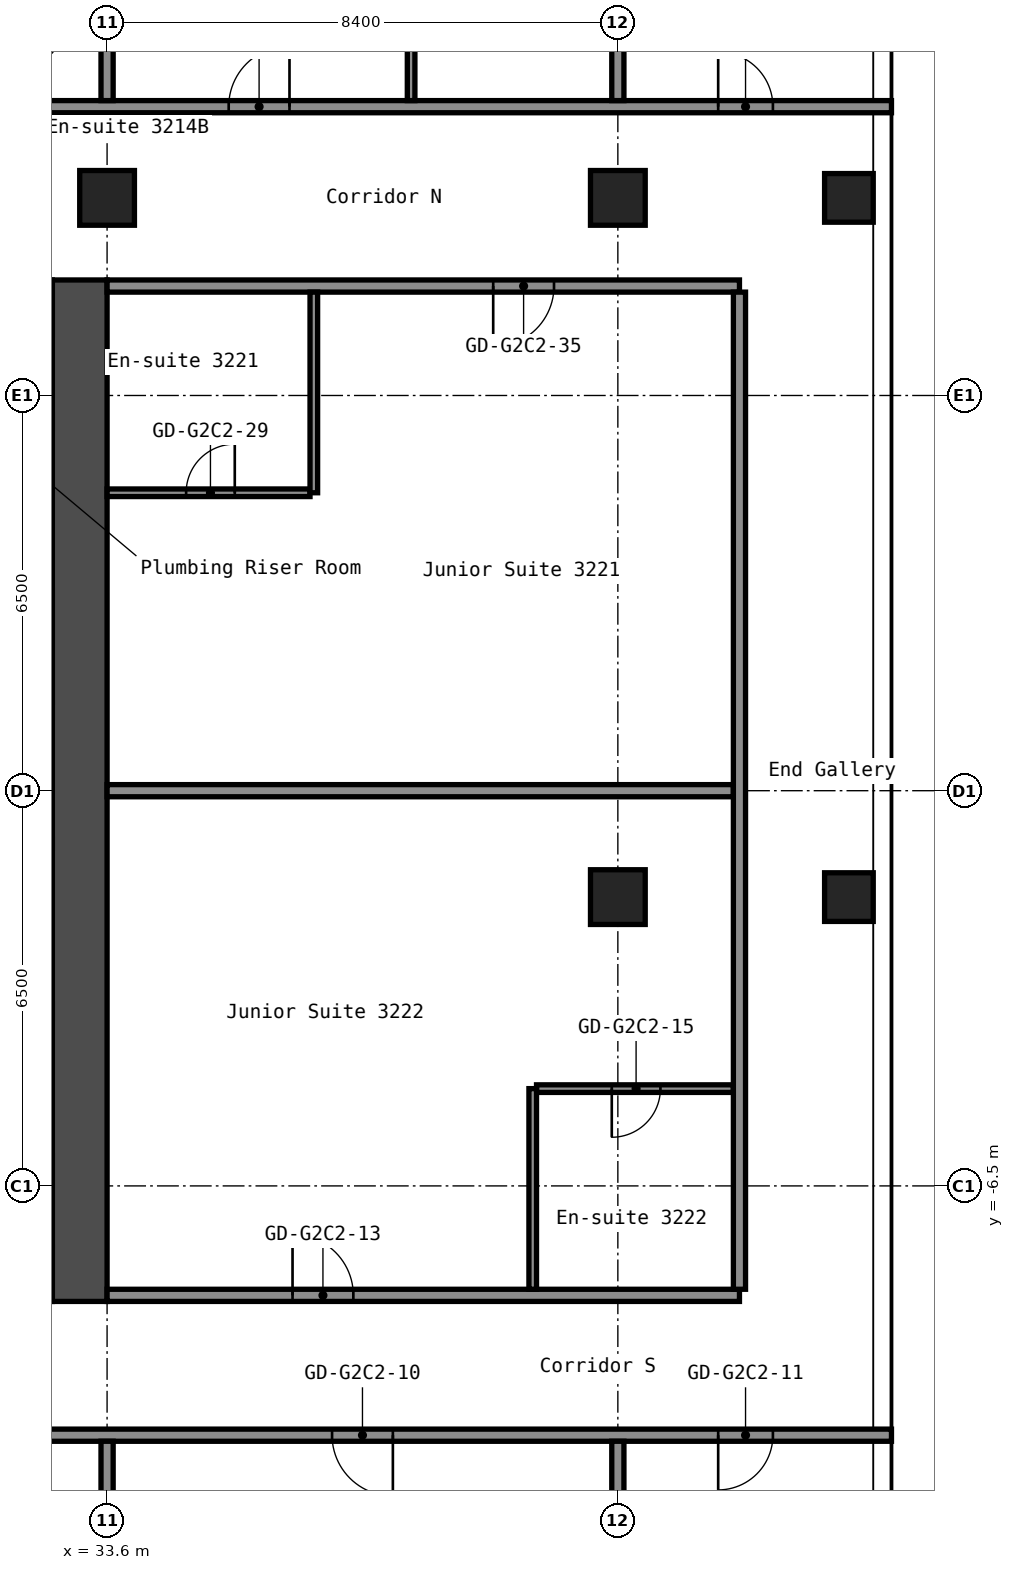
"""IFC4 building model, lengths in metres.
Left out: names, types, materials, properties, quantities, classifications, styles, units other than length and angle.
Written with IfcOpenShell. Run it as: python <this file> out.ifc"""

import sys

from ifc_helpers import new_model, si_unit, direction, frame, frame_2d, origin, origin_2d, place, context, subcontext, project, spatial, rectangle, hollow_rectangle, extrude, element, fill, save


model = new_model("IFC4")
c1 = context("Model", 3, precision=1e-05, world=origin(), true_north=direction((0.0, 1.0)))
c2 = subcontext(c1, "Body", "Model", "MODEL_VIEW")
j1 = project(units=[si_unit("LENGTHUNIT", "METRE"), si_unit("PLANEANGLEUNIT", "RADIAN")], contexts=[c1])
p1 = place(None, origin())
s1 = spatial("IfcSite", under=j1, at=p1, CompositionType="ELEMENT")
p2 = place(p1, origin())
s2 = spatial("IfcBuilding", under=s1, at=p2, CompositionType="ELEMENT")
p3 = place(p2, frame((0.0, 0.0, 113.8)))
s3 = spatial("IfcBuildingStorey", under=s2, at=p3, CompositionType="ELEMENT", Elevation=113.8)
for number, where, z_axis, x_axis in (
    (1, (33.6, 9.75, 0.0), (0.0, 0.0, 1.0), (1.0, 0.0, 0.0)),
    (2, (42.0, -1.75, 0.0), (0.0, 0.0, 1.0), (1.0, 0.0, 0.0)),
    (3, (42.0, 9.75, 0.0), (0.0, 0.0, 1.0), (1.0, 0.0, 0.0)),
):
    element("IfcColumn", number, at=place(p3, frame(where, z_axis=z_axis, x_axis=x_axis)), inside=s3, PredefinedType="COLUMN", context=c2, shape_type="SweptSolid", body=[
        extrude(hollow_rectangle(XDim=0.9, YDim=0.9, WallThickness=0.036, at=origin_2d()), origin(), (0.0, 0.0, 1.0), 2.8),
    ])
for number, where, z_axis, x_axis in (
    (4, (45.8, -1.75, 0.0), (0.0, 0.0, 1.0), (1.0, 0.0, 0.0)),
    (5, (45.8, 9.75, 0.0), (0.0, 0.0, 1.0), (1.0, 0.0, 0.0)),
):
    element("IfcColumn", number, at=place(p3, frame(where, z_axis=z_axis, x_axis=x_axis)), inside=s3, PredefinedType="COLUMN", context=c2, shape_type="SweptSolid", body=[
        extrude(hollow_rectangle(XDim=0.8, YDim=0.8, WallThickness=0.032, at=origin_2d()), origin(), (0.0, 0.0, 1.0), 2.8),
    ])
p4 = place(p3, frame((33.15, -8.4, 0.0), z_axis=(0.0, 0.0, 1.0), x_axis=(0.0, 1.0, 0.0)))
e6 = element("IfcWall", 6, at=p4, inside=s3, PredefinedType="SHEAR", context=c2, shape_type="SweptSolid", body=[
    extrude(rectangle(XDim=16.8, YDim=0.9, at=frame_2d((8.4, 0.0))), origin(), (0.0, 0.0, 1.0), 2.8),
])
p5 = place(p3, frame((16.8, -10.6, 0.0), z_axis=(0.0, 0.0, 1.0), x_axis=(1.0, 0.0, 0.0)))
e7 = element("IfcWall", 7, at=p5, inside=s3, PredefinedType="PARTITIONING", context=c2, shape_type="SweptSolid", body=[
    extrude(rectangle(XDim=29.7, YDim=0.2, at=frame_2d((14.85, 0.0))), origin(), (0.0, 0.0, 1.0), 2.8),
])
p6 = place(p5, frame((3.7, 0.0, 0.0)))
e8 = element("IfcOpeningElement", 8, at=p6, cuts=e7, PredefinedType="OPENING", context=c2, shape_type="SweptSolid", body=[
    extrude(rectangle(XDim=1.0, YDim=2.1, at=frame_2d((0.5, 1.05))), frame((0.0, 0.11, 0.0), z_axis=(0.0, -1.0, 0.0), x_axis=(1.0, 0.0, 0.0)), (0.0, 0.0, 1.0), 0.22),
])
p7 = place(p5, frame((9.46, 0.0, 0.0)))
e9 = element("IfcOpeningElement", 9, at=p7, cuts=e7, PredefinedType="OPENING", context=c2, shape_type="SweptSolid", body=[
    extrude(rectangle(XDim=0.9, YDim=2.1, at=frame_2d((0.45, 1.05))), frame((0.0, 0.11, 0.0), z_axis=(0.0, -1.0, 0.0), x_axis=(1.0, 0.0, 0.0)), (0.0, 0.0, 1.0), 0.22),
])
p8 = place(p5, frame((13.66, 0.0, 0.0)))
e10 = element("IfcOpeningElement", 10, at=p8, cuts=e7, PredefinedType="OPENING", context=c2, shape_type="SweptSolid", body=[
    extrude(rectangle(XDim=0.9, YDim=2.1, at=frame_2d((0.45, 1.05))), frame((0.0, 0.11, 0.0), z_axis=(0.0, -1.0, 0.0), x_axis=(1.0, 0.0, 0.0)), (0.0, 0.0, 1.0), 0.22),
])
p9 = place(p5, frame((20.5, 0.0, 0.0)))
e11 = element("IfcOpeningElement", 11, at=p9, cuts=e7, PredefinedType="OPENING", context=c2, shape_type="SweptSolid", body=[
    extrude(rectangle(XDim=1.0, YDim=2.1, at=frame_2d((0.5, 1.05))), frame((0.0, 0.11, 0.0), z_axis=(0.0, -1.0, 0.0), x_axis=(1.0, 0.0, 0.0)), (0.0, 0.0, 1.0), 0.22),
])
p10 = place(p5, frame((26.85, 0.0, 0.0)))
e12 = element("IfcOpeningElement", 12, at=p10, cuts=e7, PredefinedType="OPENING", context=c2, shape_type="SweptSolid", body=[
    extrude(rectangle(XDim=0.9, YDim=2.1, at=frame_2d((0.45, 1.05))), frame((0.0, 0.11, 0.0), z_axis=(0.0, -1.0, 0.0), x_axis=(1.0, 0.0, 0.0)), (0.0, 0.0, 1.0), 0.22),
])
p11 = place(p3, frame((33.6, -8.3, 0.0), z_axis=(0.0, 0.0, 1.0), x_axis=(1.0, 0.0, 0.0)))
e13 = element("IfcWall", 13, at=p11, inside=s3, PredefinedType="PARTITIONING", context=c2, shape_type="SweptSolid", body=[
    extrude(rectangle(XDim=10.4, YDim=0.2, at=frame_2d((5.2, 0.0))), origin(), (0.0, 0.0, 1.0), 2.8),
])
p12 = place(p11, frame((3.05, 0.0, 0.0)))
e14 = element("IfcOpeningElement", 14, at=p12, cuts=e13, PredefinedType="OPENING", context=c2, shape_type="SweptSolid", body=[
    extrude(rectangle(XDim=1.0, YDim=2.1, at=frame_2d((0.5, 1.05))), frame((0.0, 0.11, 0.0), z_axis=(0.0, -1.0, 0.0), x_axis=(1.0, 0.0, 0.0)), (0.0, 0.0, 1.0), 0.22),
])
p13 = place(p3, frame((40.663, -4.9, 0.0), z_axis=(0.0, 0.0, 1.0), x_axis=(1.0, 0.0, 0.0)))
e15 = element("IfcWall", 15, at=p13, inside=s3, PredefinedType="PARTITIONING", context=c2, shape_type="SweptSolid", body=[
    extrude(rectangle(XDim=3.237, YDim=0.125, at=frame_2d((1.619, 0.0))), origin(), (0.0, 0.0, 1.0), 2.8),
])
p14 = place(p13, frame((1.238, 0.0, 0.0)))
e16 = element("IfcOpeningElement", 16, at=p14, cuts=e15, PredefinedType="OPENING", context=c2, shape_type="SweptSolid", body=[
    extrude(rectangle(XDim=0.8, YDim=2.1, at=frame_2d((0.4, 1.05))), frame((0.0, 0.073, 0.0), z_axis=(0.0, -1.0, 0.0), x_axis=(1.0, 0.0, 0.0)), (0.0, 0.0, 1.0), 0.145),
])
p15 = place(p3, frame((33.6, 0.0, 0.0), z_axis=(0.0, 0.0, 1.0), x_axis=(1.0, 0.0, 0.0)))
e17 = element("IfcWall", 17, at=p15, inside=s3, PredefinedType="PARTITIONING", context=c2, shape_type="SweptSolid", body=[
    extrude(rectangle(XDim=10.3, YDim=0.2, at=frame_2d((5.15, 0.0))), origin(), (0.0, 0.0, 1.0), 2.8),
])
p16 = place(p3, frame((33.6, 4.9, 0.0), z_axis=(0.0, 0.0, 1.0), x_axis=(1.0, 0.0, 0.0)))
e18 = element("IfcWall", 18, at=p16, inside=s3, PredefinedType="PARTITIONING", context=c2, shape_type="SweptSolid", body=[
    extrude(rectangle(XDim=3.337, YDim=0.125, at=frame_2d((1.669, 0.0))), origin(), (0.0, 0.0, 1.0), 2.8),
])
p17 = place(p16, frame((1.3, 0.0, 0.0)))
e19 = element("IfcOpeningElement", 19, at=p17, cuts=e18, PredefinedType="OPENING", context=c2, shape_type="SweptSolid", body=[
    extrude(rectangle(XDim=0.8, YDim=2.1, at=frame_2d((0.4, 1.05))), frame((0.0, 0.073, 0.0), z_axis=(0.0, -1.0, 0.0), x_axis=(1.0, 0.0, 0.0)), (0.0, 0.0, 1.0), 0.145),
])
p18 = place(p3, frame((33.6, 8.3, 0.0), z_axis=(0.0, 0.0, 1.0), x_axis=(1.0, 0.0, 0.0)))
e20 = element("IfcWall", 20, at=p18, inside=s3, PredefinedType="PARTITIONING", context=c2, shape_type="SweptSolid", body=[
    extrude(rectangle(XDim=10.4, YDim=0.2, at=frame_2d((5.2, 0.0))), origin(), (0.0, 0.0, 1.0), 2.8),
])
p19 = place(p18, frame((6.35, 0.0, 0.0)))
e21 = element("IfcOpeningElement", 21, at=p19, cuts=e20, PredefinedType="OPENING", context=c2, shape_type="SweptSolid", body=[
    extrude(rectangle(XDim=1.0, YDim=2.1, at=frame_2d((0.5, 1.05))), frame((0.0, 0.11, 0.0), z_axis=(0.0, -1.0, 0.0), x_axis=(1.0, 0.0, 0.0)), (0.0, 0.0, 1.0), 0.22),
])
p20 = place(p3, frame((16.8, 11.25, 0.0), z_axis=(0.0, 0.0, 1.0), x_axis=(1.0, 0.0, 0.0)))
e22 = element("IfcWall", 22, at=p20, inside=s3, PredefinedType="PARTITIONING", context=c2, shape_type="SweptSolid", body=[
    extrude(rectangle(XDim=29.7, YDim=0.2, at=frame_2d((14.85, 0.0))), origin(), (0.0, 0.0, 1.0), 2.8),
])
p21 = place(p20, frame((2.0, 0.0, 0.0)))
e23 = element("IfcOpeningElement", 23, at=p21, cuts=e22, PredefinedType="OPENING", context=c2, shape_type="SweptSolid", body=[
    extrude(rectangle(XDim=1.0, YDim=2.1, at=frame_2d((0.5, 1.05))), frame((0.0, 0.11, 0.0), z_axis=(0.0, -1.0, 0.0), x_axis=(1.0, 0.0, 0.0)), (0.0, 0.0, 1.0), 0.22),
])
p22 = place(p20, frame((11.25, 0.0, 0.0)))
e24 = element("IfcOpeningElement", 24, at=p22, cuts=e22, PredefinedType="OPENING", context=c2, shape_type="SweptSolid", body=[
    extrude(rectangle(XDim=1.0, YDim=2.1, at=frame_2d((0.5, 1.05))), frame((0.0, 0.11, 0.0), z_axis=(0.0, -1.0, 0.0), x_axis=(1.0, 0.0, 0.0)), (0.0, 0.0, 1.0), 0.22),
])
p23 = place(p20, frame((12.95, 0.0, 0.0)))
e25 = element("IfcOpeningElement", 25, at=p23, cuts=e22, PredefinedType="OPENING", context=c2, shape_type="SweptSolid", body=[
    extrude(rectangle(XDim=1.0, YDim=2.1, at=frame_2d((0.5, 1.05))), frame((0.0, 0.11, 0.0), z_axis=(0.0, -1.0, 0.0), x_axis=(1.0, 0.0, 0.0)), (0.0, 0.0, 1.0), 0.22),
])
p24 = place(p20, frame((18.8, 0.0, 0.0)))
e26 = element("IfcOpeningElement", 26, at=p24, cuts=e22, PredefinedType="OPENING", context=c2, shape_type="SweptSolid", body=[
    extrude(rectangle(XDim=1.0, YDim=2.1, at=frame_2d((0.5, 1.05))), frame((0.0, 0.11, 0.0), z_axis=(0.0, -1.0, 0.0), x_axis=(1.0, 0.0, 0.0)), (0.0, 0.0, 1.0), 0.22),
])
p25 = place(p20, frame((26.85, 0.0, 0.0)))
e27 = element("IfcOpeningElement", 27, at=p25, cuts=e22, PredefinedType="OPENING", context=c2, shape_type="SweptSolid", body=[
    extrude(rectangle(XDim=0.9, YDim=2.1, at=frame_2d((0.45, 1.05))), frame((0.0, 0.11, 0.0), z_axis=(0.0, -1.0, 0.0), x_axis=(1.0, 0.0, 0.0)), (0.0, 0.0, 1.0), 0.22),
])
p26 = place(p3, frame((33.6, -15.55, 0.0), z_axis=(0.0, 0.0, 1.0), x_axis=(0.0, 1.0, 0.0)))
e28 = element("IfcWall", 28, at=p26, inside=s3, PredefinedType="PARTITIONING", context=c2, shape_type="SweptSolid", body=[
    extrude(rectangle(XDim=4.85, YDim=0.2, at=frame_2d((2.425, 0.0))), origin(), (0.0, 0.0, 1.0), 2.8),
])
p27 = place(p3, frame((33.6, 11.35, 0.0), z_axis=(0.0, 0.0, 1.0), x_axis=(0.0, 1.0, 0.0)))
e29 = element("IfcWall", 29, at=p27, inside=s3, PredefinedType="PARTITIONING", context=c2, shape_type="SweptSolid", body=[
    extrude(rectangle(XDim=12.2, YDim=0.2, at=frame_2d((6.1, 0.0))), origin(), (0.0, 0.0, 1.0), 2.8),
])
p28 = place(p3, frame((37.0, 4.9, 0.0), z_axis=(0.0, 0.0, 1.0), x_axis=(0.0, 1.0, 0.0)))
e30 = element("IfcWall", 30, at=p28, inside=s3, PredefinedType="PARTITIONING", context=c2, shape_type="SweptSolid", body=[
    extrude(rectangle(XDim=3.3, YDim=0.125, at=frame_2d((1.65, 0.0))), origin(), (0.0, 0.0, 1.0), 2.8),
])
p29 = place(p3, frame((38.6, 11.35, 0.0), z_axis=(0.0, 0.0, 1.0), x_axis=(0.0, 1.0, 0.0)))
e31 = element("IfcWall", 31, at=p29, inside=s3, PredefinedType="PARTITIONING", context=c2, shape_type="SweptSolid", body=[
    extrude(rectangle(XDim=3.3, YDim=0.125, at=frame_2d((1.65, 0.0))), origin(), (0.0, 0.0, 1.0), 2.8),
])
p30 = place(p3, frame((40.6, -8.2, 0.0), z_axis=(0.0, 0.0, 1.0), x_axis=(0.0, 1.0, 0.0)))
e32 = element("IfcWall", 32, at=p30, inside=s3, PredefinedType="PARTITIONING", context=c2, shape_type="SweptSolid", body=[
    extrude(rectangle(XDim=3.3, YDim=0.125, at=frame_2d((1.65, 0.0))), origin(), (0.0, 0.0, 1.0), 2.8),
])
p31 = place(p3, frame((42.0, -15.55, 0.0), z_axis=(0.0, 0.0, 1.0), x_axis=(0.0, 1.0, 0.0)))
e33 = element("IfcWall", 33, at=p31, inside=s3, PredefinedType="PARTITIONING", context=c2, shape_type="SweptSolid", body=[
    extrude(rectangle(XDim=4.85, YDim=0.2, at=frame_2d((2.425, 0.0))), origin(), (0.0, 0.0, 1.0), 2.8),
])
p32 = place(p3, frame((42.0, 11.35, 0.0), z_axis=(0.0, 0.0, 1.0), x_axis=(0.0, 1.0, 0.0)))
e34 = element("IfcWall", 34, at=p32, inside=s3, PredefinedType="PARTITIONING", context=c2, shape_type="SweptSolid", body=[
    extrude(rectangle(XDim=12.2, YDim=0.2, at=frame_2d((6.1, 0.0))), origin(), (0.0, 0.0, 1.0), 2.8),
])
p33 = place(p3, frame((44.0, -8.2, 0.0), z_axis=(0.0, 0.0, 1.0), x_axis=(0.0, 1.0, 0.0)))
e35 = element("IfcWall", 35, at=p33, inside=s3, PredefinedType="PARTITIONING", context=c2, shape_type="SweptSolid", body=[
    extrude(rectangle(XDim=16.4, YDim=0.2, at=frame_2d((8.2, 0.0))), origin(), (0.0, 0.0, 1.0), 2.8),
])
p34 = place(p9, origin())
e36 = element("IfcDoor", 36, at=p34, inside=s3, OperationType="SINGLE_SWING_RIGHT", PredefinedType="DOOR", context=c2, shape_type="SweptSolid", body=[
    extrude(rectangle(XDim=1.0, YDim=2.1, at=frame_2d((0.5, 1.05))), frame((0.0, 0.025, 0.0), z_axis=(0.0, -1.0, 0.0), x_axis=(1.0, 0.0, 0.0)), (0.0, 0.0, 1.0), 0.05),
])
fill(e11, e36)
p35 = place(p10, origin())
e37 = element("IfcDoor", 37, at=p35, inside=s3, OperationType="SINGLE_SWING_LEFT", PredefinedType="DOOR", context=c2, shape_type="SweptSolid", body=[
    extrude(rectangle(XDim=0.9, YDim=2.1, at=frame_2d((0.45, 1.05))), frame((0.0, 0.025, 0.0), z_axis=(0.0, -1.0, 0.0), x_axis=(1.0, 0.0, 0.0)), (0.0, 0.0, 1.0), 0.05),
])
fill(e12, e37)
p36 = place(p12, origin())
e38 = element("IfcDoor", 38, at=p36, inside=s3, OperationType="SINGLE_SWING_RIGHT", PredefinedType="DOOR", context=c2, shape_type="SweptSolid", body=[
    extrude(rectangle(XDim=1.0, YDim=2.1, at=frame_2d((0.5, 1.05))), frame((0.0, 0.025, 0.0), z_axis=(0.0, -1.0, 0.0), x_axis=(1.0, 0.0, 0.0)), (0.0, 0.0, 1.0), 0.05),
])
fill(e14, e38)
p37 = place(p14, origin())
e39 = element("IfcDoor", 39, at=p37, inside=s3, OperationType="SINGLE_SWING_LEFT", PredefinedType="DOOR", context=c2, shape_type="SweptSolid", body=[
    extrude(rectangle(XDim=0.8, YDim=2.1, at=frame_2d((0.4, 1.05))), frame((0.0, 0.025, 0.0), z_axis=(0.0, -1.0, 0.0), x_axis=(1.0, 0.0, 0.0)), (0.0, 0.0, 1.0), 0.05),
])
fill(e16, e39)
p38 = place(p17, origin())
e40 = element("IfcDoor", 40, at=p38, inside=s3, OperationType="SINGLE_SWING_LEFT", PredefinedType="DOOR", context=c2, shape_type="SweptSolid", body=[
    extrude(rectangle(XDim=0.8, YDim=2.1, at=frame_2d((0.4, 1.05))), frame((0.0, 0.025, 0.0), z_axis=(0.0, -1.0, 0.0), x_axis=(1.0, 0.0, 0.0)), (0.0, 0.0, 1.0), 0.05),
])
fill(e19, e40)
p39 = place(p19, origin())
e41 = element("IfcDoor", 41, at=p39, inside=s3, OperationType="SINGLE_SWING_LEFT", PredefinedType="DOOR", context=c2, shape_type="SweptSolid", body=[
    extrude(rectangle(XDim=1.0, YDim=2.1, at=frame_2d((0.5, 1.05))), frame((0.0, 0.025, 0.0), z_axis=(0.0, -1.0, 0.0), x_axis=(1.0, 0.0, 0.0)), (0.0, 0.0, 1.0), 0.05),
])
fill(e21, e41)
p40 = place(p24, origin())
e42 = element("IfcDoor", 42, at=p40, inside=s3, OperationType="SINGLE_SWING_LEFT", PredefinedType="DOOR", context=c2, shape_type="SweptSolid", body=[
    extrude(rectangle(XDim=1.0, YDim=2.1, at=frame_2d((0.5, 1.05))), frame((0.0, 0.025, 0.0), z_axis=(0.0, -1.0, 0.0), x_axis=(1.0, 0.0, 0.0)), (0.0, 0.0, 1.0), 0.05),
])
fill(e26, e42)
p41 = place(p25, origin())
e43 = element("IfcDoor", 43, at=p41, inside=s3, OperationType="SINGLE_SWING_RIGHT", PredefinedType="DOOR", context=c2, shape_type="SweptSolid", body=[
    extrude(rectangle(XDim=0.9, YDim=2.1, at=frame_2d((0.45, 1.05))), frame((0.0, 0.025, 0.0), z_axis=(0.0, -1.0, 0.0), x_axis=(1.0, 0.0, 0.0)), (0.0, 0.0, 1.0), 0.05),
])
fill(e27, e43)
save(model, sys.argv[1])
